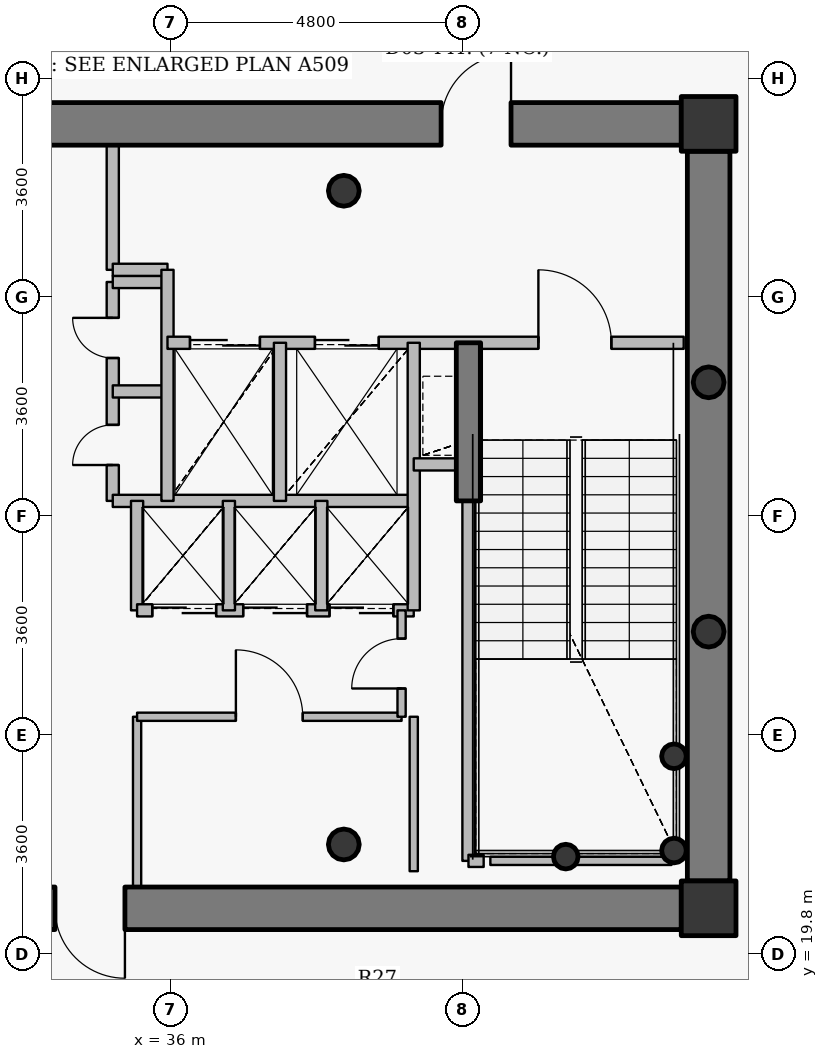
"""IFC4 building model, lengths in metres.
Left out: names, types, materials, properties, quantities, classifications, styles, units other than length and angle.
Written with IfcOpenShell. Run it as: python <this file> out.ifc"""

import sys

from ifc_helpers import new_model, si_unit, direction, frame, frame_2d, origin, origin_2d, place, context, subcontext, project, spatial, rectangle, hollow_circle, extrude, source, transform, mapped, element, fill, save


model = new_model("IFC4")
c1 = context("Model", 3, precision=1e-05, world=origin(), true_north=direction((0.0, 1.0)))
c2 = subcontext(c1, "Body", "Model", "MODEL_VIEW")
j1 = project(units=[si_unit("LENGTHUNIT", "METRE"), si_unit("PLANEANGLEUNIT", "RADIAN")], contexts=[c1])
p1 = place(None, origin())
s1 = spatial("IfcSite", under=j1, at=p1, CompositionType="ELEMENT")
p2 = place(p1, origin())
s2 = spatial("IfcBuilding", under=s1, at=p2, CompositionType="ELEMENT")
p3 = place(p2, frame((0.0, 0.0, 327.8)))
s3 = spatial("IfcBuildingStorey", under=s2, at=p3, CompositionType="ELEMENT", Elevation=327.8)
for number, where, z_axis, x_axis in (
    (1, (44.85, 20.55, 0.0), (0.0, 0.0, 1.0), (1.0, 0.0, 0.0)),
    (2, (44.85, 33.45, 0.0), (0.0, 0.0, 1.0), (1.0, 0.0, 0.0)),
):
    element("IfcColumn", number, at=place(p3, frame(where, z_axis=z_axis, x_axis=x_axis)), inside=s3, PredefinedType="COLUMN", context=c2, shape_type="SweptSolid", body=[
        extrude(rectangle(XDim=0.9, YDim=0.9, at=origin_2d()), origin(), (0.0, 0.0, 1.0), 3.8),
    ])
for number, where, z_axis, x_axis in (
    (3, (38.85, 21.6, 0.0), (0.0, 0.0, 1.0), (1.0, 0.0, 0.0)),
    (4, (38.85, 32.35, 0.0), (0.0, 0.0, 1.0), (1.0, 0.0, 0.0)),
):
    element("IfcColumn", number, at=place(p3, frame(where, z_axis=z_axis, x_axis=x_axis)), inside=s3, PredefinedType="COLUMN", context=c2, shape_type="SweptSolid", body=[
        extrude(hollow_circle(Radius=0.254, WallThickness=0.02, at=origin_2d()), origin(), (0.0, 0.0, 1.0), 3.8),
    ])
for number, where, z_axis, x_axis in (
    (5, (44.28, 21.5, 0.0), (0.0, 0.0, 1.0), (1.0, 0.0, 0.0)),
    (6, (44.28, 23.05, 0.0), (0.0, 0.0, 1.0), (1.0, 0.0, 0.0)),
    (7, (42.5, 21.4, 0.0), (0.0, 0.0, 1.0), (1.0, 0.0, 0.0)),
):
    element("IfcColumn", number, at=place(p3, frame(where, z_axis=z_axis, x_axis=x_axis)), inside=s3, PredefinedType="COLUMN", context=c2, shape_type="SweptSolid", body=[
        extrude(hollow_circle(Radius=0.203, WallThickness=0.016, at=origin_2d()), origin(), (0.0, 0.0, 1.0), 3.8),
    ])
p4 = place(p3, frame((27.6, 33.45, 0.0), z_axis=(0.0, 0.0, 1.0), x_axis=(1.0, 0.0, 0.0)))
e8 = element("IfcWall", 8, at=p4, inside=s3, PredefinedType="SHEAR", context=c2, shape_type="SweptSolid", body=[
    extrude(rectangle(XDim=16.8, YDim=0.7, at=frame_2d((8.4, 0.0))), origin(), (0.0, 0.0, 1.0), 3.1),
])
p5 = place(p4, frame((12.85, 0.0, 0.0)))
e9 = element("IfcOpeningElement", 9, at=p5, cuts=e8, PredefinedType="OPENING", context=c2, shape_type="SweptSolid", body=[
    extrude(rectangle(XDim=1.15, YDim=2.15, at=origin_2d()), frame((0.575, 0.36, 1.075), z_axis=(0.0, -1.0, 0.0), x_axis=(1.0, 0.0, 0.0)), (0.0, 0.0, 1.0), 0.72),
])
p6 = place(p3, frame((44.85, 33.0, 0.0), z_axis=(0.0, 0.0, 1.0), x_axis=(0.0, -1.0, 0.0)))
e10 = element("IfcWall", 10, at=p6, inside=s3, PredefinedType="SHEAR", context=c2, shape_type="SweptSolid", body=[
    extrude(rectangle(XDim=12.0, YDim=0.7, at=frame_2d((6.0, 0.0))), origin(), (0.0, 0.0, 1.0), 3.1),
])
p7 = place(p3, frame((44.4, 20.55, 0.0), z_axis=(0.0, 0.0, 1.0), x_axis=(-1.0, 0.0, 0.0)))
e11 = element("IfcWall", 11, at=p7, inside=s3, PredefinedType="SHEAR", context=c2, shape_type="SweptSolid", body=[
    extrude(rectangle(XDim=16.8, YDim=0.7, at=frame_2d((8.4, 0.0))), origin(), (0.0, 0.0, 1.0), 3.1),
])
p8 = place(p7, frame((13.0, 0.0, 0.0)))
e12 = element("IfcOpeningElement", 12, at=p8, cuts=e11, PredefinedType="OPENING", context=c2, shape_type="SweptSolid", body=[
    extrude(rectangle(XDim=1.15, YDim=2.15, at=origin_2d()), frame((0.575, 0.36, 1.075), z_axis=(0.0, -1.0, 0.0), x_axis=(1.0, 0.0, 0.0)), (0.0, 0.0, 1.0), 0.72),
])
p9 = place(p7, frame((9.15, 0.0, 0.0)))
e13 = element("IfcOpeningElement", 13, at=p9, cuts=e11, PredefinedType="OPENING", context=c2, shape_type="SweptSolid", body=[
    extrude(rectangle(XDim=1.15, YDim=2.15, at=origin_2d()), frame((0.575, 0.36, 1.075), z_axis=(0.0, -1.0, 0.0), x_axis=(1.0, 0.0, 0.0)), (0.0, 0.0, 1.0), 0.72),
])
p10 = place(p3, frame((40.9, 27.25, 0.0), z_axis=(0.0, 0.0, 1.0), x_axis=(0.0, 1.0, 0.0)))
e14 = element("IfcWall", 14, at=p10, inside=s3, PredefinedType="SHEAR", context=c2, shape_type="SweptSolid", body=[
    extrude(rectangle(XDim=2.6, YDim=0.4, at=frame_2d((1.3, 0.0))), origin(), (0.0, 0.0, 1.0), 3.15),
])
for number, where, z_axis, x_axis in (
    (15, (44.85, 25.1, 0.0), (0.0, 0.0, 1.0), (1.0, 0.0, 0.0)),
    (16, (44.85, 29.2, 0.0), (0.0, 0.0, 1.0), (1.0, 0.0, 0.0)),
):
    element("IfcColumn", number, at=place(p3, frame(where, z_axis=z_axis, x_axis=x_axis)), inside=s3, PredefinedType="COLUMN", context=c2, shape_type="SweptSolid", body=[
        extrude(hollow_circle(Radius=0.254, WallThickness=0.02, at=origin_2d()), origin(), (0.0, 0.0, 1.0), 3.8),
    ])
p11 = place(p3, frame((35.05, 27.25, 0.0), z_axis=(0.0, 0.0, 1.0), x_axis=(0.0, 1.0, 0.0)))
e17 = element("IfcWall", 17, at=p11, inside=s3, PredefinedType="PARTITIONING", context=c2, shape_type="SweptSolid", body=[
    extrude(rectangle(XDim=3.6, YDim=0.2, at=frame_2d((1.8, 0.0))), origin(), (0.0, 0.0, 1.0), 3.55),
])
p12 = place(p11, frame((0.59, 0.0, 0.0)))
e18 = element("IfcOpeningElement", 18, at=p12, cuts=e17, PredefinedType="OPENING", context=c2, shape_type="SweptSolid", body=[
    extrude(rectangle(XDim=0.66, YDim=2.05, at=origin_2d()), frame((0.33, 0.11, 1.025), z_axis=(0.0, -1.0, 0.0), x_axis=(1.0, 0.0, 0.0)), (0.0, 0.0, 1.0), 0.22),
])
p13 = place(p11, frame((2.35, 0.0, 0.0)))
e19 = element("IfcOpeningElement", 19, at=p13, cuts=e17, PredefinedType="OPENING", context=c2, shape_type="SweptSolid", body=[
    extrude(rectangle(XDim=0.66, YDim=2.05, at=origin_2d()), frame((0.33, 0.11, 1.025), z_axis=(0.0, -1.0, 0.0), x_axis=(1.0, 0.0, 0.0)), (0.0, 0.0, 1.0), 0.22),
])
p14 = place(p3, frame((35.05, 27.25, 0.0), z_axis=(0.0, 0.0, 1.0), x_axis=(1.0, 0.0, 0.0)))
e20 = element("IfcWall", 20, at=p14, inside=s3, PredefinedType="PARTITIONING", context=c2, shape_type="SweptSolid", body=[
    extrude(rectangle(XDim=4.95, YDim=0.2, at=frame_2d((2.475, 0.0))), origin(), (0.0, 0.0, 1.0), 3.135),
])
for number, where, z_axis, x_axis in (
    (21, (35.05, 29.05, 0.0), (0.0, 0.0, 1.0), (1.0, 0.0, 0.0)),
    (22, (35.05, 30.85, 0.0), (0.0, 0.0, 1.0), (1.0, 0.0, 0.0)),
):
    element("IfcWall", number, at=place(p3, frame(where, z_axis=z_axis, x_axis=x_axis)), inside=s3, PredefinedType="PARTITIONING", context=c2, shape_type="SweptSolid", body=[
        extrude(rectangle(XDim=0.9, YDim=0.2, at=frame_2d((0.45, 0.0))), origin(), (0.0, 0.0, 1.0), 3.55),
    ])
p15 = place(p3, frame((35.05, 31.05, 0.0), z_axis=(0.0, 0.0, 1.0), x_axis=(0.0, 1.0, 0.0)))
e23 = element("IfcWall", 23, at=p15, inside=s3, PredefinedType="PARTITIONING", context=c2, shape_type="SweptSolid", body=[
    extrude(rectangle(XDim=2.05, YDim=0.2, at=frame_2d((1.025, 0.0))), origin(), (0.0, 0.0, 1.0), 3.135),
])
p16 = place(p3, frame((35.05, 31.05, 0.0), z_axis=(0.0, 0.0, 1.0), x_axis=(1.0, 0.0, 0.0)))
e24 = element("IfcWall", 24, at=p16, inside=s3, PredefinedType="PARTITIONING", context=c2, shape_type="SweptSolid", body=[
    extrude(rectangle(XDim=0.9, YDim=0.2, at=frame_2d((0.45, 0.0))), origin(), (0.0, 0.0, 1.0), 3.55),
])
p17 = place(p3, frame((35.45, 20.9, 0.0), z_axis=(0.0, 0.0, 1.0), x_axis=(0.0, 1.0, 0.0)))
e25 = element("IfcWall", 25, at=p17, inside=s3, PredefinedType="PARTITIONING", context=c2, shape_type="SweptSolid", body=[
    extrude(rectangle(XDim=2.8, YDim=0.135, at=frame_2d((1.4, 0.0))), origin(), (0.0, 0.0, 1.0), 3.135),
])
p18 = place(p3, frame((35.45, 23.7, 0.0), z_axis=(0.0, 0.0, 1.0), x_axis=(1.0, 0.0, 0.0)))
e26 = element("IfcWall", 26, at=p18, inside=s3, PredefinedType="PARTITIONING", context=c2, shape_type="SweptSolid", body=[
    extrude(rectangle(XDim=4.35, YDim=0.135, at=frame_2d((2.175, 0.0))), origin(), (0.0, 0.0, 1.0), 3.135),
])
p19 = place(p18, frame((1.625, 0.0, 0.0)))
e27 = element("IfcOpeningElement", 27, at=p19, cuts=e26, PredefinedType="OPENING", context=c2, shape_type="SweptSolid", body=[
    extrude(rectangle(XDim=1.1, YDim=2.15, at=origin_2d()), frame((0.55, 0.078, 1.075), z_axis=(0.0, -1.0, 0.0), x_axis=(1.0, 0.0, 0.0)), (0.0, 0.0, 1.0), 0.155),
])
p20 = place(p3, frame((35.45, 25.45, 0.0), z_axis=(0.0, 0.0, 1.0), x_axis=(0.0, 1.0, 0.0)))
e28 = element("IfcWall", 28, at=p20, inside=s3, PredefinedType="PARTITIONING", context=c2, shape_type="SweptSolid", body=[
    extrude(rectangle(XDim=1.8, YDim=0.2, at=frame_2d((0.9, 0.0))), origin(), (0.0, 0.0, 1.0), 3.55),
])
p21 = place(p3, frame((35.45, 25.45, 0.0), z_axis=(0.0, 0.0, 1.0), x_axis=(1.0, 0.0, 0.0)))
e29 = element("IfcWall", 29, at=p21, inside=s3, PredefinedType="PARTITIONING", context=c2, shape_type="SweptSolid", body=[
    extrude(rectangle(XDim=4.55, YDim=0.2, at=frame_2d((2.275, 0.0))), origin(), (0.0, 0.0, 1.0), 3.135),
])
p22 = place(p21, frame((0.25, 0.0, 0.0)))
e30 = element("IfcOpeningElement", 30, at=p22, cuts=e29, PredefinedType="OPENING", context=c2, shape_type="SweptSolid", body=[
    extrude(rectangle(XDim=1.05, YDim=2.15, at=origin_2d()), frame((0.525, 0.11, 1.075), z_axis=(0.0, -1.0, 0.0), x_axis=(1.0, 0.0, 0.0)), (0.0, 0.0, 1.0), 0.22),
])
p23 = place(p21, frame((1.745, 0.0, 0.0)))
e31 = element("IfcOpeningElement", 31, at=p23, cuts=e29, PredefinedType="OPENING", context=c2, shape_type="SweptSolid", body=[
    extrude(rectangle(XDim=1.05, YDim=2.15, at=origin_2d()), frame((0.525, 0.11, 1.075), z_axis=(0.0, -1.0, 0.0), x_axis=(1.0, 0.0, 0.0)), (0.0, 0.0, 1.0), 0.22),
])
p24 = place(p21, frame((3.165, 0.0, 0.0)))
e32 = element("IfcOpeningElement", 32, at=p24, cuts=e29, PredefinedType="OPENING", context=c2, shape_type="SweptSolid", body=[
    extrude(rectangle(XDim=1.05, YDim=2.15, at=origin_2d()), frame((0.525, 0.11, 1.075), z_axis=(0.0, -1.0, 0.0), x_axis=(1.0, 0.0, 0.0)), (0.0, 0.0, 1.0), 0.22),
])
p25 = place(p3, frame((35.95, 27.25, 0.0), z_axis=(0.0, 0.0, 1.0), x_axis=(0.0, 1.0, 0.0)))
e33 = element("IfcWall", 33, at=p25, inside=s3, PredefinedType="PARTITIONING", context=c2, shape_type="SweptSolid", body=[
    extrude(rectangle(XDim=3.8, YDim=0.2, at=frame_2d((1.9, 0.0))), origin(), (0.0, 0.0, 1.0), 3.55),
])
p26 = place(p3, frame((35.95, 29.85, 0.0), z_axis=(0.0, 0.0, 1.0), x_axis=(1.0, 0.0, 0.0)))
e34 = element("IfcWall", 34, at=p26, inside=s3, PredefinedType="PARTITIONING", context=c2, shape_type="SweptSolid", body=[
    extrude(rectangle(XDim=8.49, YDim=0.2, at=frame_2d((4.245, 0.0))), origin(), (0.0, 0.0, 1.0), 3.135),
])
p27 = place(p26, frame((6.1, 0.0, 0.0)))
e35 = element("IfcOpeningElement", 35, at=p27, cuts=e34, PredefinedType="OPENING", context=c2, shape_type="SweptSolid", body=[
    extrude(rectangle(XDim=1.2, YDim=2.15, at=origin_2d()), frame((0.6, 0.11, 1.075), z_axis=(0.0, -1.0, 0.0), x_axis=(1.0, 0.0, 0.0)), (0.0, 0.0, 1.0), 0.22),
])
p28 = place(p26, frame((0.37, 0.0, 0.0)))
e36 = element("IfcOpeningElement", 36, at=p28, cuts=e34, PredefinedType="OPENING", context=c2, shape_type="SweptSolid", body=[
    extrude(rectangle(XDim=1.15, YDim=2.15, at=origin_2d()), frame((0.575, 0.11, 1.075), z_axis=(0.0, -1.0, 0.0), x_axis=(1.0, 0.0, 0.0)), (0.0, 0.0, 1.0), 0.22),
])
p29 = place(p26, frame((2.425, 0.0, 0.0)))
e37 = element("IfcOpeningElement", 37, at=p29, cuts=e34, PredefinedType="OPENING", context=c2, shape_type="SweptSolid", body=[
    extrude(rectangle(XDim=1.05, YDim=2.15, at=origin_2d()), frame((0.525, 0.11, 1.075), z_axis=(0.0, -1.0, 0.0), x_axis=(1.0, 0.0, 0.0)), (0.0, 0.0, 1.0), 0.22),
])
p30 = place(p3, frame((36.96, 25.45, 0.0), z_axis=(0.0, 0.0, 1.0), x_axis=(0.0, 1.0, 0.0)))
e38 = element("IfcWall", 38, at=p30, inside=s3, PredefinedType="PARTITIONING", context=c2, shape_type="SweptSolid", body=[
    extrude(rectangle(XDim=1.8, YDim=0.2, at=frame_2d((0.9, 0.0))), origin(), (0.0, 0.0, 1.0), 3.55),
])
p31 = place(p3, frame((37.8, 27.25, 0.0), z_axis=(0.0, 0.0, 1.0), x_axis=(0.0, 1.0, 0.0)))
e39 = element("IfcWall", 39, at=p31, inside=s3, PredefinedType="PARTITIONING", context=c2, shape_type="SweptSolid", body=[
    extrude(rectangle(XDim=2.6, YDim=0.2, at=frame_2d((1.3, 0.0))), origin(), (0.0, 0.0, 1.0), 3.55),
])
p32 = place(p3, frame((38.48, 25.45, 0.0), z_axis=(0.0, 0.0, 1.0), x_axis=(0.0, 1.0, 0.0)))
e40 = element("IfcWall", 40, at=p32, inside=s3, PredefinedType="PARTITIONING", context=c2, shape_type="SweptSolid", body=[
    extrude(rectangle(XDim=1.8, YDim=0.2, at=frame_2d((0.9, 0.0))), origin(), (0.0, 0.0, 1.0), 3.55),
])
p33 = place(p3, frame((39.8, 23.7, 0.0), z_axis=(0.0, 0.0, 1.0), x_axis=(0.0, 1.0, 0.0)))
e41 = element("IfcWall", 41, at=p33, inside=s3, PredefinedType="PARTITIONING", context=c2, shape_type="SweptSolid", body=[
    extrude(rectangle(XDim=1.75, YDim=0.135, at=frame_2d((0.875, 0.0))), origin(), (0.0, 0.0, 1.0), 3.55),
])
p34 = place(p33, frame((0.465, 0.0, 0.0)))
e42 = element("IfcOpeningElement", 42, at=p34, cuts=e41, PredefinedType="OPENING", context=c2, shape_type="SweptSolid", body=[
    extrude(rectangle(XDim=0.82, YDim=2.1, at=origin_2d()), frame((0.41, 0.078, 1.05), z_axis=(0.0, -1.0, 0.0), x_axis=(1.0, 0.0, 0.0)), (0.0, 0.0, 1.0), 0.155),
])
p35 = place(p3, frame((40.0, 25.45, 0.0), z_axis=(0.0, 0.0, 1.0), x_axis=(0.0, 1.0, 0.0)))
e43 = element("IfcWall", 43, at=p35, inside=s3, PredefinedType="PARTITIONING", context=c2, shape_type="SweptSolid", body=[
    extrude(rectangle(XDim=4.4, YDim=0.2, at=frame_2d((2.2, 0.0))), origin(), (0.0, 0.0, 1.0), 3.55),
])
p36 = place(p3, frame((40.0, 27.85, 0.0), z_axis=(0.0, 0.0, 1.0), x_axis=(1.0, 0.0, 0.0)))
e44 = element("IfcWall", 44, at=p36, inside=s3, PredefinedType="PARTITIONING", context=c2, shape_type="SweptSolid", body=[
    extrude(rectangle(XDim=0.9, YDim=0.2, at=frame_2d((0.45, 0.0))), origin(), (0.0, 0.0, 1.0), 3.55),
])
p37 = place(p3, frame((40.9, 21.33, 0.0), z_axis=(0.0, 0.0, 1.0), x_axis=(0.0, 1.0, 0.0)))
e45 = element("IfcWall", 45, at=p37, inside=s3, PredefinedType="PARTITIONING", context=c2, shape_type="SweptSolid", body=[
    extrude(rectangle(XDim=5.91, YDim=0.2, at=frame_2d((2.955, 0.0))), origin(), (0.0, 0.0, 1.0), 3.085),
])
p38 = place(p3, frame((40.9, 21.33, 0.0), z_axis=(0.0, 0.0, 1.0), x_axis=(1.0, 0.0, 0.0)))
e46 = element("IfcWall", 46, at=p38, inside=s3, PredefinedType="PARTITIONING", context=c2, shape_type="SweptSolid", body=[
    extrude(rectangle(XDim=0.25, YDim=0.2, at=frame_2d((0.125, 0.0))), origin(), (0.0, 0.0, 1.0), 3.085),
])
p39 = place(p3, frame((44.24, 21.33, 0.0), z_axis=(0.0, 0.0, 1.0), x_axis=(-1.0, 0.0, 0.0)))
e47 = element("IfcWall", 47, at=p39, inside=s3, PredefinedType="PARTITIONING", context=c2, shape_type="SweptSolid", body=[
    extrude(rectangle(XDim=2.98, YDim=0.135, at=frame_2d((1.49, 0.0))), origin(), (0.0, 0.0, 1.0), 3.085),
])
p40 = place(p3, frame((40.0, 23.7, 0.0), z_axis=(0.0, 0.0, 1.0), x_axis=(0.0, -1.0, 0.0)))
e48 = element("IfcWall", 48, at=p40, inside=s3, PredefinedType="PARTITIONING", context=c2, shape_type="SweptSolid", body=[
    extrude(rectangle(XDim=2.54, YDim=0.135, at=frame_2d((1.27, 0.0))), origin(), (0.0, 0.0, 1.0), 3.085),
])
for number, where, z_axis, x_axis in (
    (49, (45.2, 33.8, 0.0), (0.0, 0.0, 1.0), (-1.0, 0.0, 0.0)),
    (50, (44.41, 20.2, 0.0), (0.0, 0.0, 1.0), (1.0, 0.0, 0.0)),
):
    element("IfcWall", number, at=place(p3, frame(where, z_axis=z_axis, x_axis=x_axis)), inside=s3, PredefinedType="PARTITIONING", context=c2, shape_type="SweptSolid", body=[
        extrude(rectangle(XDim=0.79, YDim=0.135, at=frame_2d((0.395, 0.0))), origin(), (0.0, 0.0, 1.0), 3.085),
    ])
for number, where, z_axis, x_axis in (
    (51, (45.2, 20.508, 0.0), (0.0, 0.0, 1.0), (0.0, 1.0, 0.0)),
    (52, (45.2, 33.01, 0.0), (0.0, 0.0, 1.0), (0.0, 1.0, 0.0)),
):
    element("IfcWall", number, at=place(p3, frame(where, z_axis=z_axis, x_axis=x_axis)), inside=s3, PredefinedType="PARTITIONING", context=c2, shape_type="SweptSolid", body=[
        extrude(rectangle(XDim=0.482, YDim=0.135, at=frame_2d((0.241, 0.0))), origin(), (0.0, 0.0, 1.0), 3.55),
    ])
m1 = source(origin(), c2, "Body", "SweptSolid", [
    extrude(rectangle(XDim=1.15, YDim=2.15, at=origin_2d()), frame((0.575, 0.025, 1.075), z_axis=(0.0, -1.0, 0.0), x_axis=(1.0, 0.0, 0.0)), (0.0, 0.0, 1.0), 0.05),
])
p41 = place(p5, origin())
e53 = element("IfcDoor", 53, at=p41, inside=s3, OperationType="SINGLE_SWING_RIGHT", PredefinedType="DOOR", context=c2, shape_type="MappedRepresentation", body=[
    mapped(m1, transform((0.0, 0.0, 0.0), x_axis=(1.0, 0.0, 0.0), y_axis=(0.0, 1.0, 0.0), z_axis=(0.0, 0.0, 1.0), scale=1.0)),
])
fill(e9, e53)
p42 = place(p9, origin())
e54 = element("IfcDoor", 54, at=p42, inside=s3, OperationType="SINGLE_SWING_LEFT", PredefinedType="DOOR", context=c2, shape_type="MappedRepresentation", body=[
    mapped(m1, transform((0.0, 0.0, 0.0), x_axis=(1.0, 0.0, 0.0), y_axis=(0.0, 1.0, 0.0), z_axis=(0.0, 0.0, 1.0), scale=1.0)),
])
fill(e13, e54)
m2 = source(origin(), c2, "Body", "SweptSolid", [
    extrude(rectangle(XDim=1.2, YDim=2.15, at=origin_2d()), frame((0.6, 0.025, 1.075), z_axis=(0.0, -1.0, 0.0), x_axis=(1.0, 0.0, 0.0)), (0.0, 0.0, 1.0), 0.05),
])
p43 = place(p27, origin())
e55 = element("IfcDoor", 55, at=p43, inside=s3, OperationType="SINGLE_SWING_LEFT", PredefinedType="DOOR", context=c2, shape_type="MappedRepresentation", body=[
    mapped(m2, transform((0.0, 0.0, 0.0), x_axis=(1.0, 0.0, 0.0), y_axis=(0.0, 1.0, 0.0), z_axis=(0.0, 0.0, 1.0), scale=1.0)),
])
fill(e35, e55)
m3 = source(origin(), c2, "Body", "SweptSolid", [
    extrude(rectangle(XDim=1.15, YDim=2.15, at=origin_2d()), frame((0.575, 0.025, 1.075), z_axis=(0.0, -1.0, 0.0), x_axis=(1.0, 0.0, 0.0)), (0.0, 0.0, 1.0), 0.05),
])
p44 = place(p28, origin())
e56 = element("IfcDoor", 56, at=p44, inside=s3, OperationType="DOUBLE_DOOR_SLIDING", PredefinedType="USERDEFINED", context=c2, shape_type="MappedRepresentation", body=[
    mapped(m3, transform((0.0, 0.0, 0.0), x_axis=(1.0, 0.0, 0.0), y_axis=(0.0, 1.0, 0.0), z_axis=(0.0, 0.0, 1.0), scale=1.0)),
])
fill(e36, e56)
m4 = source(origin(), c2, "Body", "SweptSolid", [
    extrude(rectangle(XDim=1.05, YDim=2.15, at=origin_2d()), frame((0.525, 0.025, 1.075), z_axis=(0.0, -1.0, 0.0), x_axis=(1.0, 0.0, 0.0)), (0.0, 0.0, 1.0), 0.05),
])
p45 = place(p29, origin())
e57 = element("IfcDoor", 57, at=p45, inside=s3, OperationType="DOUBLE_DOOR_SLIDING", PredefinedType="USERDEFINED", context=c2, shape_type="MappedRepresentation", body=[
    mapped(m4, transform((0.0, 0.0, 0.0), x_axis=(1.0, 0.0, 0.0), y_axis=(0.0, 1.0, 0.0), z_axis=(0.0, 0.0, 1.0), scale=1.0)),
])
fill(e37, e57)
p46 = place(p22, origin())
e58 = element("IfcDoor", 58, at=p46, inside=s3, OperationType="DOUBLE_DOOR_SLIDING", PredefinedType="USERDEFINED", context=c2, shape_type="MappedRepresentation", body=[
    mapped(m4, transform((0.0, 0.0, 0.0), x_axis=(1.0, 0.0, 0.0), y_axis=(0.0, 1.0, 0.0), z_axis=(0.0, 0.0, 1.0), scale=1.0)),
])
fill(e30, e58)
p47 = place(p23, origin())
e59 = element("IfcDoor", 59, at=p47, inside=s3, OperationType="DOUBLE_DOOR_SLIDING", PredefinedType="USERDEFINED", context=c2, shape_type="MappedRepresentation", body=[
    mapped(m4, transform((0.0, 0.0, 0.0), x_axis=(1.0, 0.0, 0.0), y_axis=(0.0, 1.0, 0.0), z_axis=(0.0, 0.0, 1.0), scale=1.0)),
])
fill(e31, e59)
p48 = place(p24, origin())
e60 = element("IfcDoor", 60, at=p48, inside=s3, OperationType="DOUBLE_DOOR_SLIDING", PredefinedType="USERDEFINED", context=c2, shape_type="MappedRepresentation", body=[
    mapped(m4, transform((0.0, 0.0, 0.0), x_axis=(1.0, 0.0, 0.0), y_axis=(0.0, 1.0, 0.0), z_axis=(0.0, 0.0, 1.0), scale=1.0)),
])
fill(e32, e60)
m5 = source(origin(), c2, "Body", "SweptSolid", [
    extrude(rectangle(XDim=0.66, YDim=2.05, at=origin_2d()), frame((0.33, 0.025, 1.025), z_axis=(0.0, -1.0, 0.0), x_axis=(1.0, 0.0, 0.0)), (0.0, 0.0, 1.0), 0.05),
])
p49 = place(p12, origin())
e61 = element("IfcDoor", 61, at=p49, inside=s3, OperationType="SINGLE_SWING_LEFT", PredefinedType="USERDEFINED", context=c2, shape_type="MappedRepresentation", body=[
    mapped(m5, transform((0.0, 0.0, 0.0), x_axis=(1.0, 0.0, 0.0), y_axis=(0.0, 1.0, 0.0), z_axis=(0.0, 0.0, 1.0), scale=1.0)),
])
fill(e18, e61)
p50 = place(p13, origin())
e62 = element("IfcDoor", 62, at=p50, inside=s3, OperationType="SINGLE_SWING_RIGHT", PredefinedType="USERDEFINED", context=c2, shape_type="MappedRepresentation", body=[
    mapped(m5, transform((0.0, 0.0, 0.0), x_axis=(1.0, 0.0, 0.0), y_axis=(0.0, 1.0, 0.0), z_axis=(0.0, 0.0, 1.0), scale=1.0)),
])
fill(e19, e62)
m6 = source(origin(), c2, "Body", "SweptSolid", [
    extrude(rectangle(XDim=1.1, YDim=2.15, at=origin_2d()), frame((0.55, 0.025, 1.075), z_axis=(0.0, -1.0, 0.0), x_axis=(1.0, 0.0, 0.0)), (0.0, 0.0, 1.0), 0.05),
])
p51 = place(p19, origin())
e63 = element("IfcDoor", 63, at=p51, inside=s3, OperationType="SINGLE_SWING_LEFT", PredefinedType="DOOR", context=c2, shape_type="MappedRepresentation", body=[
    mapped(m6, transform((0.0, 0.0, 0.0), x_axis=(1.0, 0.0, 0.0), y_axis=(0.0, 1.0, 0.0), z_axis=(0.0, 0.0, 1.0), scale=1.0)),
])
fill(e27, e63)
m7 = source(origin(), c2, "Body", "SweptSolid", [
    extrude(rectangle(XDim=0.82, YDim=2.1, at=origin_2d()), frame((0.41, 0.025, 1.05), z_axis=(0.0, -1.0, 0.0), x_axis=(1.0, 0.0, 0.0)), (0.0, 0.0, 1.0), 0.05),
])
p52 = place(p34, origin())
e64 = element("IfcDoor", 64, at=p52, inside=s3, OperationType="SINGLE_SWING_LEFT", PredefinedType="DOOR", context=c2, shape_type="MappedRepresentation", body=[
    mapped(m7, transform((0.0, 0.0, 0.0), x_axis=(1.0, 0.0, 0.0), y_axis=(0.0, 1.0, 0.0), z_axis=(0.0, 0.0, 1.0), scale=1.0)),
])
fill(e42, e64)
save(model, sys.argv[1])
